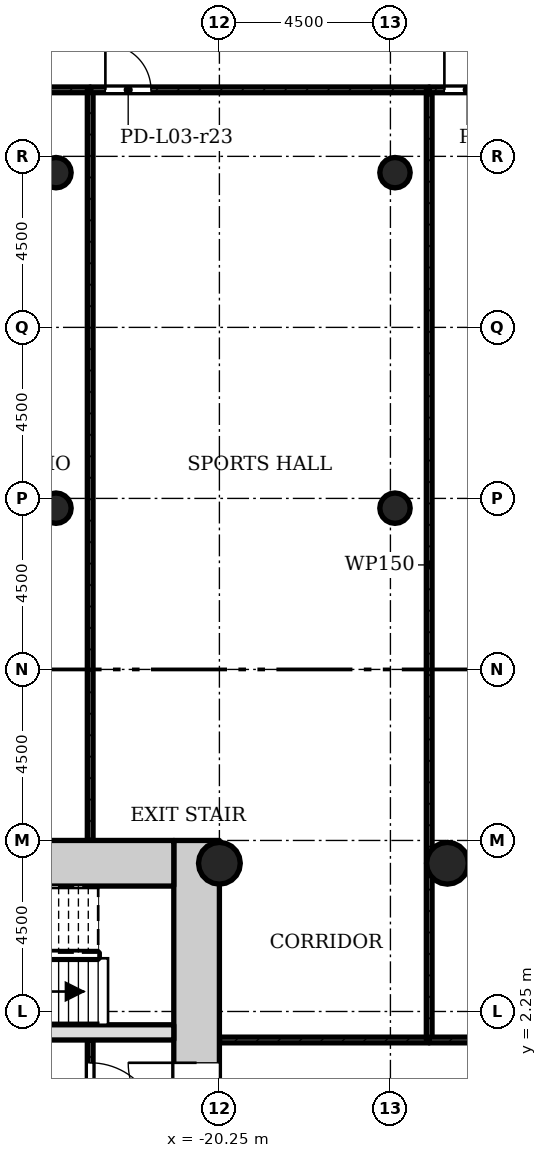
"""IFC4 building model, lengths in metres.
Left out: names, types, materials, properties, quantities, classifications, styles, units other than length and angle.
Written with IfcOpenShell. Run it as: python <this file> out.ifc"""

import sys

from ifc_helpers import new_model, si_unit, direction, frame, frame_2d, origin, origin_2d, place, context, subcontext, project, spatial, rectangle, hollow_circle, extrude, element, fill, save


model = new_model("IFC4")
c1 = context("Model", 3, precision=1e-05, world=origin(), true_north=direction((0.0, 1.0)))
c2 = subcontext(c1, "Body", "Model", "MODEL_VIEW")
j1 = project(units=[si_unit("LENGTHUNIT", "METRE"), si_unit("PLANEANGLEUNIT", "RADIAN")], contexts=[c1])
p1 = place(None, origin())
s1 = spatial("IfcSite", under=j1, at=p1, CompositionType="ELEMENT")
p2 = place(p1, origin())
s2 = spatial("IfcBuilding", under=s1, at=p2, CompositionType="ELEMENT")
p3 = place(p2, frame((0.0, 0.0, 15.5)))
s3 = spatial("IfcBuildingStorey", under=s2, at=p3, CompositionType="ELEMENT", Elevation=15.5)
p4 = place(p3, frame((-20.85, -5.55, 0.0), z_axis=(0.0, 0.0, 1.0), x_axis=(0.0, 1.0, 0.0)))
e1 = element("IfcWall", 1, at=p4, inside=s3, PredefinedType="SHEAR", context=c2, shape_type="SweptSolid", body=[
    extrude(rectangle(XDim=12.3, YDim=1.2, at=frame_2d((6.15, 0.0))), origin(), (0.0, 0.0, 1.0), 4.5),
])
p5 = place(p4, frame((4.65, 0.0, 0.0)))
e2 = element("IfcOpeningElement", 2, at=p5, cuts=e1, PredefinedType="OPENING", context=c2, shape_type="SweptSolid", body=[
    extrude(rectangle(XDim=1.8, YDim=2.1, at=frame_2d((0.9, 1.05))), frame((0.0, 0.61, 0.0), z_axis=(0.0, -1.0, 0.0), x_axis=(1.0, 0.0, 0.0)), (0.0, 0.0, 1.0), 1.22),
])
p6 = place(p3, frame((-21.45, 6.15, 0.0), z_axis=(0.0, 0.0, 1.0), x_axis=(-1.0, 0.0, 0.0)))
e3 = element("IfcWall", 3, at=p6, inside=s3, PredefinedType="SHEAR", context=c2, shape_type="SweptSolid", body=[
    extrude(rectangle(XDim=7.8, YDim=1.2, at=frame_2d((3.9, 0.0))), origin(), (0.0, 0.0, 1.0), 4.5),
])
p7 = place(p3, frame((-28.05, 1.7, 0.0), z_axis=(0.0, 0.0, 1.0), x_axis=(1.0, 0.0, 0.0)))
e4 = element("IfcWall", 4, at=p7, inside=s3, PredefinedType="SHEAR", context=c2, shape_type="SweptSolid", body=[
    extrude(rectangle(XDim=6.6, YDim=0.4, at=frame_2d((3.3, 0.0))), origin(), (0.0, 0.0, 1.0), 4.5),
])
p8 = place(p7, frame((0.45, 0.0, 0.0)))
e5 = element("IfcOpeningElement", 5, at=p8, cuts=e4, PredefinedType="OPENING", context=c2, shape_type="SweptSolid", body=[
    extrude(rectangle(XDim=0.9, YDim=2.1, at=frame_2d((0.45, 1.05))), frame((0.0, 0.21, 0.0), z_axis=(0.0, -1.0, 0.0), x_axis=(1.0, 0.0, 0.0)), (0.0, 0.0, 1.0), 0.42),
])
for number, where, z_axis, x_axis in (
    (6, (-20.25, 6.15, 0.0), (0.0, 0.0, 1.0), (1.0, 0.0, 0.0)),
    (7, (-14.25, 6.15, 0.0), (0.0, 0.0, 1.0), (1.0, 0.0, 0.0)),
):
    element("IfcColumn", number, at=place(p3, frame(where, z_axis=z_axis, x_axis=x_axis)), inside=s3, PredefinedType="COLUMN", context=c2, shape_type="SweptSolid", body=[
        extrude(hollow_circle(Radius=0.55, WallThickness=0.04, at=origin_2d()), origin(), (0.0, 0.0, 1.0), 4.5),
    ])
for number, where, z_axis, x_axis in (
    (8, (-24.55, 15.493, 0.0), (0.0, 0.0, 1.0), (1.0, 0.0, 0.0)),
    (9, (-15.63, 15.493, 0.0), (0.0, 0.0, 1.0), (1.0, 0.0, 0.0)),
    (10, (-24.55, 24.321, 0.0), (0.0, 0.0, 1.0), (1.0, 0.0, 0.0)),
    (11, (-15.63, 24.321, 0.0), (0.0, 0.0, 1.0), (1.0, 0.0, 0.0)),
):
    element("IfcColumn", number, at=place(p3, frame(where, z_axis=z_axis, x_axis=x_axis)), inside=s3, PredefinedType="COLUMN", context=c2, shape_type="SweptSolid", body=[
        extrude(hollow_circle(Radius=0.4, WallThickness=0.028, at=origin_2d()), origin(), (0.0, 0.0, 1.0), 4.5),
    ])
p9 = place(p3, frame((-23.65, -1.5, 0.0), z_axis=(0.0, 0.0, 1.0), x_axis=(0.0, 1.0, 0.0)))
e12 = element("IfcWall", 12, at=p9, inside=s3, PredefinedType="PARTITIONING", context=c2, shape_type="SweptSolid", body=[
    extrude(rectangle(XDim=3.0, YDim=0.15, at=frame_2d((1.5, 0.0))), origin(), (0.0, 0.0, 1.0), 4.08),
])
p10 = place(p9, frame((0.6, 0.0, 0.0)))
e13 = element("IfcOpeningElement", 13, at=p10, cuts=e12, PredefinedType="OPENING", context=c2, shape_type="SweptSolid", body=[
    extrude(rectangle(XDim=1.8, YDim=2.1, at=frame_2d((0.9, 1.05))), frame((0.0, 0.085, 0.0), z_axis=(0.0, -1.0, 0.0), x_axis=(1.0, 0.0, 0.0)), (0.0, 0.0, 1.0), 0.17),
])
p11 = place(p3, frame((-32.57, 26.5, 0.0), z_axis=(0.0, 0.0, 1.0), x_axis=(1.0, 0.0, 0.0)))
e14 = element("IfcWall", 14, at=p11, inside=s3, PredefinedType="PARTITIONING", context=c2, shape_type="SweptSolid", body=[
    extrude(rectangle(XDim=8.92, YDim=0.15, at=frame_2d((4.46, 0.0))), origin(), (0.0, 0.0, 1.0), 4.08),
])
p12 = place(p11, frame((0.4, 0.0, 0.0)))
e15 = element("IfcOpeningElement", 15, at=p12, cuts=e14, PredefinedType="OPENING", context=c2, shape_type="SweptSolid", body=[
    extrude(rectangle(XDim=1.2, YDim=2.1, at=frame_2d((0.6, 1.05))), frame((0.0, 0.085, 0.0), z_axis=(0.0, -1.0, 0.0), x_axis=(1.0, 0.0, 0.0)), (0.0, 0.0, 1.0), 0.17),
])
p13 = place(p3, frame((-23.65, 26.5, 0.0), z_axis=(0.0, 0.0, 1.0), x_axis=(0.0, -1.0, 0.0)))
e16 = element("IfcWall", 16, at=p13, inside=s3, PredefinedType="PARTITIONING", context=c2, shape_type="SweptSolid", body=[
    extrude(rectangle(XDim=19.75, YDim=0.15, at=frame_2d((9.875, 0.0))), origin(), (0.0, 0.0, 1.0), 4.08),
])
p14 = place(p3, frame((-23.65, 26.5, 0.0), z_axis=(0.0, 0.0, 1.0), x_axis=(1.0, 0.0, 0.0)))
e17 = element("IfcWall", 17, at=p14, inside=s3, PredefinedType="PARTITIONING", context=c2, shape_type="SweptSolid", body=[
    extrude(rectangle(XDim=8.92, YDim=0.15, at=frame_2d((4.46, 0.0))), origin(), (0.0, 0.0, 1.0), 4.08),
])
p15 = place(p14, frame((0.4, 0.0, 0.0)))
e18 = element("IfcOpeningElement", 18, at=p15, cuts=e17, PredefinedType="OPENING", context=c2, shape_type="SweptSolid", body=[
    extrude(rectangle(XDim=1.2, YDim=2.1, at=frame_2d((0.6, 1.05))), frame((0.0, 0.085, 0.0), z_axis=(0.0, -1.0, 0.0), x_axis=(1.0, 0.0, 0.0)), (0.0, 0.0, 1.0), 0.17),
])
p16 = place(p3, frame((-14.73, 1.5, 0.0), z_axis=(0.0, 0.0, 1.0), x_axis=(-1.0, 0.0, 0.0)))
e19 = element("IfcWall", 19, at=p16, inside=s3, PredefinedType="PARTITIONING", context=c2, shape_type="SweptSolid", body=[
    extrude(rectangle(XDim=5.52, YDim=0.15, at=frame_2d((2.76, 0.0))), origin(), (0.0, 0.0, 1.0), 4.08),
])
p17 = place(p3, frame((-14.73, 26.5, 0.0), z_axis=(0.0, 0.0, 1.0), x_axis=(0.0, -1.0, 0.0)))
e20 = element("IfcWall", 20, at=p17, inside=s3, PredefinedType="PARTITIONING", context=c2, shape_type="SweptSolid", body=[
    extrude(rectangle(XDim=25.0, YDim=0.15, at=frame_2d((12.5, 0.0))), origin(), (0.0, 0.0, 1.0), 4.08),
])
p18 = place(p3, frame((-14.73, 26.5, 0.0), z_axis=(0.0, 0.0, 1.0), x_axis=(1.0, 0.0, 0.0)))
e21 = element("IfcWall", 21, at=p18, inside=s3, PredefinedType="PARTITIONING", context=c2, shape_type="SweptSolid", body=[
    extrude(rectangle(XDim=8.92, YDim=0.15, at=frame_2d((4.46, 0.0))), origin(), (0.0, 0.0, 1.0), 4.08),
])
p19 = place(p18, frame((0.4, 0.0, 0.0)))
e22 = element("IfcOpeningElement", 22, at=p19, cuts=e21, PredefinedType="OPENING", context=c2, shape_type="SweptSolid", body=[
    extrude(rectangle(XDim=1.2, YDim=2.1, at=frame_2d((0.6, 1.05))), frame((0.0, 0.085, 0.0), z_axis=(0.0, -1.0, 0.0), x_axis=(1.0, 0.0, 0.0)), (0.0, 0.0, 1.0), 0.17),
])
p20 = place(p3, frame((-5.81, 1.5, 0.0), z_axis=(0.0, 0.0, 1.0), x_axis=(-1.0, 0.0, 0.0)))
e23 = element("IfcWall", 23, at=p20, inside=s3, PredefinedType="PARTITIONING", context=c2, shape_type="SweptSolid", body=[
    extrude(rectangle(XDim=8.92, YDim=0.15, at=frame_2d((4.46, 0.0))), origin(), (0.0, 0.0, 1.0), 4.08),
])
p21 = place(p10, origin())
e24 = element("IfcDoor", 24, at=p21, inside=s3, OperationType="SINGLE_SWING_LEFT", PredefinedType="DOOR", context=c2, shape_type="SweptSolid", body=[
    extrude(rectangle(XDim=1.8, YDim=2.1, at=frame_2d((0.9, 1.05))), frame((0.0, 0.025, 0.0), z_axis=(0.0, -1.0, 0.0), x_axis=(1.0, 0.0, 0.0)), (0.0, 0.0, 1.0), 0.05),
])
fill(e13, e24)
p22 = place(p15, origin())
e25 = element("IfcDoor", 25, at=p22, inside=s3, OperationType="SINGLE_SWING_RIGHT", PredefinedType="DOOR", context=c2, shape_type="SweptSolid", body=[
    extrude(rectangle(XDim=1.2, YDim=2.1, at=frame_2d((0.6, 1.05))), frame((0.0, 0.025, 0.0), z_axis=(0.0, -1.0, 0.0), x_axis=(1.0, 0.0, 0.0)), (0.0, 0.0, 1.0), 0.05),
])
fill(e18, e25)
p23 = place(p19, origin())
e26 = element("IfcDoor", 26, at=p23, inside=s3, OperationType="SINGLE_SWING_RIGHT", PredefinedType="DOOR", context=c2, shape_type="SweptSolid", body=[
    extrude(rectangle(XDim=1.2, YDim=2.1, at=frame_2d((0.6, 1.05))), frame((0.0, 0.025, 0.0), z_axis=(0.0, -1.0, 0.0), x_axis=(1.0, 0.0, 0.0)), (0.0, 0.0, 1.0), 0.05),
])
fill(e22, e26)
p24 = place(p5, origin())
e27 = element("IfcDoor", 27, at=p24, inside=s3, OperationType="SINGLE_SWING_LEFT", PredefinedType="DOOR", context=c2, shape_type="SweptSolid", body=[
    extrude(rectangle(XDim=1.8, YDim=2.1, at=frame_2d((0.9, 1.05))), frame((0.0, 0.025, 0.0), z_axis=(0.0, -1.0, 0.0), x_axis=(1.0, 0.0, 0.0)), (0.0, 0.0, 1.0), 0.05),
])
fill(e2, e27)
save(model, sys.argv[1])
